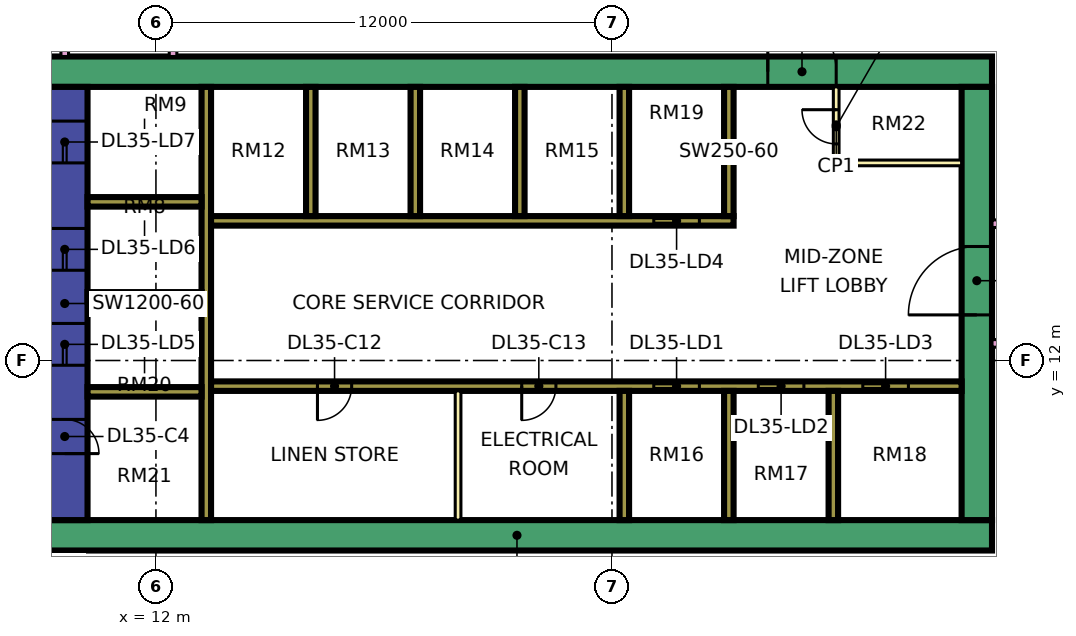
"""IFC4 building model, lengths in metres.
Left out: names, types, materials, properties, quantities, classifications, styles, units other than length and angle.
Written with IfcOpenShell. Run it as: python <this file> out.ifc"""

import sys

from ifc_helpers import new_model, si_unit, direction, frame, frame_2d, origin, place, context, subcontext, project, spatial, rectangle, extrude, element, fill, save


model = new_model("IFC4")
c1 = context("Model", 3, precision=1e-05, world=origin(), true_north=direction((0.0, 1.0)))
c2 = subcontext(c1, "Body", "Model", "MODEL_VIEW")
j1 = project(units=[si_unit("LENGTHUNIT", "METRE"), si_unit("PLANEANGLEUNIT", "RADIAN")], contexts=[c1])
p1 = place(None, origin())
s1 = spatial("IfcSite", under=j1, at=p1, CompositionType="ELEMENT")
p2 = place(p1, origin())
s2 = spatial("IfcBuilding", under=s1, at=p2, CompositionType="ELEMENT")
p3 = place(p2, frame((0.0, 0.0, 157.4)))
s3 = spatial("IfcBuildingStorey", under=s2, at=p3, CompositionType="ELEMENT", Elevation=157.4)
p4 = place(p3, frame((9.0, 7.4, 0.0), z_axis=(0.0, 0.0, 1.0), x_axis=(1.0, 0.0, 0.0)))
e1 = element("IfcWall", 1, at=p4, inside=s3, PredefinedType="SHEAR", context=c2, shape_type="SweptSolid", body=[
    extrude(rectangle(XDim=25.0, YDim=0.8, at=frame_2d((12.5, 0.0))), origin(), (0.0, 0.0, 1.0), 3.75),
])
p5 = place(p3, frame((9.0, 19.6, 0.0), z_axis=(0.0, 0.0, 1.0), x_axis=(1.0, 0.0, 0.0)))
e2 = element("IfcWall", 2, at=p5, inside=s3, PredefinedType="SHEAR", context=c2, shape_type="SweptSolid", body=[
    extrude(rectangle(XDim=25.0, YDim=0.8, at=frame_2d((12.5, 0.0))), origin(), (0.0, 0.0, 1.0), 3.75),
])
p6 = place(p5, frame((19.1, 0.0, 0.0)))
e3 = element("IfcOpeningElement", 3, at=p6, cuts=e2, PredefinedType="OPENING", context=c2, shape_type="SweptSolid", body=[
    extrude(rectangle(XDim=1.8, YDim=2.4, at=frame_2d((0.9, 1.2))), frame((0.0, 0.41, 0.0), z_axis=(0.0, -1.0, 0.0), x_axis=(1.0, 0.0, 0.0)), (0.0, 0.0, 1.0), 0.82),
])
p7 = place(p3, frame((9.6, 7.8, 0.0), z_axis=(0.0, 0.0, 1.0), x_axis=(0.0, 1.0, 0.0)))
e4 = element("IfcWall", 4, at=p7, inside=s3, PredefinedType="SHEAR", context=c2, shape_type="SweptSolid", body=[
    extrude(rectangle(XDim=11.4, YDim=1.2, at=frame_2d((5.7, 0.0))), origin(), (0.0, 0.0, 1.0), 3.75),
])
p8 = place(p7, frame((4.075, 0.0, 0.0)))
e5 = element("IfcOpeningElement", 5, at=p8, cuts=e4, PredefinedType="OPENING", context=c2, shape_type="SweptSolid", body=[
    extrude(rectangle(XDim=1.1, YDim=2.2, at=frame_2d((0.55, 1.1))), frame((0.0, 0.61, 0.0), z_axis=(0.0, -1.0, 0.0), x_axis=(1.0, 0.0, 0.0)), (0.0, 0.0, 1.0), 1.22),
])
p9 = place(p7, frame((6.575, 0.0, 0.0)))
e6 = element("IfcOpeningElement", 6, at=p9, cuts=e4, PredefinedType="OPENING", context=c2, shape_type="SweptSolid", body=[
    extrude(rectangle(XDim=1.1, YDim=2.2, at=frame_2d((0.55, 1.1))), frame((0.0, 0.61, 0.0), z_axis=(0.0, -1.0, 0.0), x_axis=(1.0, 0.0, 0.0)), (0.0, 0.0, 1.0), 1.22),
])
p10 = place(p7, frame((9.4, 0.0, 0.0)))
e7 = element("IfcOpeningElement", 7, at=p10, cuts=e4, PredefinedType="OPENING", context=c2, shape_type="SweptSolid", body=[
    extrude(rectangle(XDim=1.1, YDim=2.2, at=frame_2d((0.55, 1.1))), frame((0.0, 0.61, 0.0), z_axis=(0.0, -1.0, 0.0), x_axis=(1.0, 0.0, 0.0)), (0.0, 0.0, 1.0), 1.22),
])
p11 = place(p7, frame((1.75, 0.0, 0.0)))
e8 = element("IfcOpeningElement", 8, at=p11, cuts=e4, PredefinedType="OPENING", context=c2, shape_type="SweptSolid", body=[
    extrude(rectangle(XDim=0.9, YDim=2.1, at=frame_2d((0.45, 1.05))), frame((0.0, 0.61, 0.0), z_axis=(0.0, -1.0, 0.0), x_axis=(1.0, 0.0, 0.0)), (0.0, 0.0, 1.0), 1.22),
])
p12 = place(p3, frame((33.6, 7.8, 0.0), z_axis=(0.0, 0.0, 1.0), x_axis=(0.0, 1.0, 0.0)))
e9 = element("IfcWall", 9, at=p12, inside=s3, PredefinedType="SHEAR", context=c2, shape_type="SweptSolid", body=[
    extrude(rectangle(XDim=11.4, YDim=0.8, at=frame_2d((5.7, 0.0))), origin(), (0.0, 0.0, 1.0), 3.75),
])
p13 = place(p12, frame((5.4, 0.0, 0.0)))
e10 = element("IfcOpeningElement", 10, at=p13, cuts=e9, PredefinedType="OPENING", context=c2, shape_type="SweptSolid", body=[
    extrude(rectangle(XDim=1.8, YDim=2.4, at=frame_2d((0.9, 1.2))), frame((0.0, 0.41, 0.0), z_axis=(0.0, -1.0, 0.0), x_axis=(1.0, 0.0, 0.0)), (0.0, 0.0, 1.0), 0.82),
])
p14 = place(p3, frame((13.325, 7.8, 0.0), z_axis=(0.0, 0.0, 1.0), x_axis=(0.0, 1.0, 0.0)))
e11 = element("IfcWall", 11, at=p14, inside=s3, PredefinedType="SHEAR", context=c2, shape_type="SweptSolid", body=[
    extrude(rectangle(XDim=11.4, YDim=0.25, at=frame_2d((5.7, 0.0))), origin(), (0.0, 0.0, 1.0), 3.75),
])
p15 = place(p3, frame((13.45, 11.325, 0.0), z_axis=(0.0, 0.0, 1.0), x_axis=(1.0, 0.0, 0.0)))
e12 = element("IfcWall", 12, at=p15, inside=s3, PredefinedType="SHEAR", context=c2, shape_type="SweptSolid", body=[
    extrude(rectangle(XDim=19.75, YDim=0.25, at=frame_2d((9.875, 0.0))), origin(), (0.0, 0.0, 1.0), 3.75),
])
p16 = place(p15, frame((11.65, 0.0, 0.0)))
e13 = element("IfcOpeningElement", 13, at=p16, cuts=e12, PredefinedType="OPENING", context=c2, shape_type="SweptSolid", body=[
    extrude(rectangle(XDim=1.2, YDim=2.2, at=frame_2d((0.6, 1.1))), frame((0.0, 0.135, 0.0), z_axis=(0.0, -1.0, 0.0), x_axis=(1.0, 0.0, 0.0)), (0.0, 0.0, 1.0), 0.27),
])
p17 = place(p15, frame((14.4, 0.0, 0.0)))
e14 = element("IfcOpeningElement", 14, at=p17, cuts=e12, PredefinedType="OPENING", context=c2, shape_type="SweptSolid", body=[
    extrude(rectangle(XDim=1.2, YDim=2.2, at=frame_2d((0.6, 1.1))), frame((0.0, 0.135, 0.0), z_axis=(0.0, -1.0, 0.0), x_axis=(1.0, 0.0, 0.0)), (0.0, 0.0, 1.0), 0.27),
])
p18 = place(p15, frame((17.15, 0.0, 0.0)))
e15 = element("IfcOpeningElement", 15, at=p18, cuts=e12, PredefinedType="OPENING", context=c2, shape_type="SweptSolid", body=[
    extrude(rectangle(XDim=1.2, YDim=2.2, at=frame_2d((0.6, 1.1))), frame((0.0, 0.135, 0.0), z_axis=(0.0, -1.0, 0.0), x_axis=(1.0, 0.0, 0.0)), (0.0, 0.0, 1.0), 0.27),
])
p19 = place(p15, frame((2.8, 0.0, 0.0)))
e16 = element("IfcOpeningElement", 16, at=p19, cuts=e12, PredefinedType="OPENING", context=c2, shape_type="SweptSolid", body=[
    extrude(rectangle(XDim=0.9, YDim=2.1, at=frame_2d((0.45, 1.05))), frame((0.0, 0.135, 0.0), z_axis=(0.0, -1.0, 0.0), x_axis=(1.0, 0.0, 0.0)), (0.0, 0.0, 1.0), 0.27),
])
p20 = place(p15, frame((8.175, 0.0, 0.0)))
e17 = element("IfcOpeningElement", 17, at=p20, cuts=e12, PredefinedType="OPENING", context=c2, shape_type="SweptSolid", body=[
    extrude(rectangle(XDim=0.9, YDim=2.1, at=frame_2d((0.45, 1.05))), frame((0.0, 0.135, 0.0), z_axis=(0.0, -1.0, 0.0), x_axis=(1.0, 0.0, 0.0)), (0.0, 0.0, 1.0), 0.27),
])
p21 = place(p3, frame((13.45, 15.675, 0.0), z_axis=(0.0, 0.0, 1.0), x_axis=(1.0, 0.0, 0.0)))
e18 = element("IfcWall", 18, at=p21, inside=s3, PredefinedType="SHEAR", context=c2, shape_type="SweptSolid", body=[
    extrude(rectangle(XDim=13.75, YDim=0.25, at=frame_2d((6.875, 0.0))), origin(), (0.0, 0.0, 1.0), 3.75),
])
p22 = place(p21, frame((11.65, 0.0, 0.0)))
e19 = element("IfcOpeningElement", 19, at=p22, cuts=e18, PredefinedType="OPENING", context=c2, shape_type="SweptSolid", body=[
    extrude(rectangle(XDim=1.2, YDim=2.2, at=frame_2d((0.6, 1.1))), frame((0.0, 0.135, 0.0), z_axis=(0.0, -1.0, 0.0), x_axis=(1.0, 0.0, 0.0)), (0.0, 0.0, 1.0), 0.27),
])
for number, where, z_axis, x_axis in (
    (20, (10.2, 11.175, 0.0), (0.0, 0.0, 1.0), (1.0, 0.0, 0.0)),
    (21, (10.2, 13.675, 0.0), (0.0, 0.0, 1.0), (1.0, 0.0, 0.0)),
    (22, (10.2, 16.175, 0.0), (0.0, 0.0, 1.0), (1.0, 0.0, 0.0)),
):
    element("IfcWall", number, at=place(p3, frame(where, z_axis=z_axis, x_axis=x_axis)), inside=s3, PredefinedType="SHEAR", context=c2, shape_type="SweptSolid", body=[
        extrude(rectangle(XDim=3.0, YDim=0.25, at=frame_2d((1.5, 0.0))), origin(), (0.0, 0.0, 1.0), 3.75),
    ])
for number, where, z_axis, x_axis in (
    (23, (24.325, 7.8, 0.0), (0.0, 0.0, 1.0), (0.0, 1.0, 0.0)),
    (24, (27.075, 7.8, 0.0), (0.0, 0.0, 1.0), (0.0, 1.0, 0.0)),
    (25, (29.825, 7.8, 0.0), (0.0, 0.0, 1.0), (0.0, 1.0, 0.0)),
    (26, (16.075, 15.8, 0.0), (0.0, 0.0, 1.0), (0.0, 1.0, 0.0)),
    (27, (18.825, 15.8, 0.0), (0.0, 0.0, 1.0), (0.0, 1.0, 0.0)),
    (28, (21.575, 15.8, 0.0), (0.0, 0.0, 1.0), (0.0, 1.0, 0.0)),
    (29, (24.325, 15.8, 0.0), (0.0, 0.0, 1.0), (0.0, 1.0, 0.0)),
    (30, (27.075, 15.8, 0.0), (0.0, 0.0, 1.0), (0.0, 1.0, 0.0)),
):
    element("IfcWall", number, at=place(p3, frame(where, z_axis=z_axis, x_axis=x_axis)), inside=s3, PredefinedType="SHEAR", context=c2, shape_type="SweptSolid", body=[
        extrude(rectangle(XDim=3.4, YDim=0.25, at=frame_2d((1.7, 0.0))), origin(), (0.0, 0.0, 1.0), 3.75),
    ])
p23 = place(p3, frame((-1.447, 12.553, 0.0), z_axis=(0.0, 0.0, 1.0), x_axis=(0.707106781187, -0.707106781187, 0.0)))
e31 = element("IfcWall", 31, at=p23, inside=s3, PredefinedType="SOLIDWALL", context=c2, shape_type="SweptSolid", body=[
    extrude(rectangle(XDim=19.799, YDim=0.15, at=frame_2d((9.899, 0.0))), origin(), (0.0, 0.0, 1.0), 3.35),
])
p24 = place(p23, frame((2.212, 0.0, 0.45)))
e32 = element("IfcOpeningElement", 32, at=p24, cuts=e31, PredefinedType="OPENING", context=c2, shape_type="SweptSolid", body=[
    extrude(rectangle(XDim=3.0, YDim=2.4, at=frame_2d((1.5, 1.2))), frame((0.0, 0.085, 0.0), z_axis=(0.0, -1.0, 0.0), x_axis=(1.0, 0.0, 0.0)), (0.0, 0.0, 1.0), 0.17),
])
p25 = place(p23, frame((10.216, 0.0, 0.45)))
e33 = element("IfcOpeningElement", 33, at=p25, cuts=e31, PredefinedType="OPENING", context=c2, shape_type="SweptSolid", body=[
    extrude(rectangle(XDim=3.0, YDim=2.4, at=frame_2d((1.5, 1.2))), frame((0.0, 0.085, 0.0), z_axis=(0.0, -1.0, 0.0), x_axis=(1.0, 0.0, 0.0)), (0.0, 0.0, 1.0), 0.17),
])
p26 = place(p3, frame((19.95, 7.8, 0.0), z_axis=(0.0, 0.0, 1.0), x_axis=(0.0, 1.0, 0.0)))
e34 = element("IfcWall", 34, at=p26, inside=s3, PredefinedType="PARTITIONING", context=c2, shape_type="SweptSolid", body=[
    extrude(rectangle(XDim=3.4, YDim=0.15, at=frame_2d((1.7, 0.0))), origin(), (0.0, 0.0, 1.0), 3.35),
])
p27 = place(p3, frame((29.9, 17.2, 0.0), z_axis=(0.0, 0.0, 1.0), x_axis=(0.0, 1.0, 0.0)))
e35 = element("IfcWall", 35, at=p27, inside=s3, PredefinedType="PARTITIONING", context=c2, shape_type="SweptSolid", body=[
    extrude(rectangle(XDim=2.0, YDim=0.15, at=frame_2d((1.0, 0.0))), origin(), (0.0, 0.0, 1.0), 3.35),
])
p28 = place(p27, frame((0.5, 0.0, 0.0)))
e36 = element("IfcOpeningElement", 36, at=p28, cuts=e35, PredefinedType="OPENING", context=c2, shape_type="SweptSolid", body=[
    extrude(rectangle(XDim=0.9, YDim=2.1, at=frame_2d((0.45, 1.05))), frame((0.0, 0.085, 0.0), z_axis=(0.0, -1.0, 0.0), x_axis=(1.0, 0.0, 0.0)), (0.0, 0.0, 1.0), 0.17),
])
p29 = place(p3, frame((29.9, 17.2, 0.0), z_axis=(0.0, 0.0, 1.0), x_axis=(1.0, 0.0, 0.0)))
e37 = element("IfcWall", 37, at=p29, inside=s3, PredefinedType="PARTITIONING", context=c2, shape_type="SweptSolid", body=[
    extrude(rectangle(XDim=3.3, YDim=0.15, at=frame_2d((1.65, 0.0))), origin(), (0.0, 0.0, 1.0), 3.35),
])
p30 = place(p3, frame((9.6, 20.0, 0.0), z_axis=(0.0, 0.0, 1.0), x_axis=(0.0, 1.0, 0.0)))
e38 = element("IfcWall", 38, at=p30, inside=s3, PredefinedType="PARTITIONING", context=c2, shape_type="SweptSolid", body=[
    extrude(rectangle(XDim=42.926, YDim=0.2, at=frame_2d((21.463, 0.0))), origin(), (0.0, 0.0, 1.0), 3.35),
])
p31 = place(p30, frame((40.8, 0.0, 0.0)))
e39 = element("IfcOpeningElement", 39, at=p31, cuts=e38, PredefinedType="OPENING", context=c2, shape_type="SweptSolid", body=[
    extrude(rectangle(XDim=1.0, YDim=2.1, at=frame_2d((0.5, 1.05))), frame((0.0, 0.11, 0.0), z_axis=(0.0, -1.0, 0.0), x_axis=(1.0, 0.0, 0.0)), (0.0, 0.0, 1.0), 0.22),
])
p32 = place(p30, frame((0.6, 0.0, 0.0)))
e40 = element("IfcOpeningElement", 40, at=p32, cuts=e38, PredefinedType="OPENING", context=c2, shape_type="SweptSolid", body=[
    extrude(rectangle(XDim=1.2, YDim=2.1, at=frame_2d((0.6, 1.05))), frame((0.0, 0.11, 0.0), z_axis=(0.0, -1.0, 0.0), x_axis=(1.0, 0.0, 0.0)), (0.0, 0.0, 1.0), 0.22),
])
p33 = place(p30, frame((3.9, 0.0, 0.0)))
e41 = element("IfcOpeningElement", 41, at=p33, cuts=e38, PredefinedType="OPENING", context=c2, shape_type="SweptSolid", body=[
    extrude(rectangle(XDim=1.0, YDim=2.1, at=frame_2d((0.5, 1.05))), frame((0.0, 0.11, 0.0), z_axis=(0.0, -1.0, 0.0), x_axis=(1.0, 0.0, 0.0)), (0.0, 0.0, 1.0), 0.22),
])
p34 = place(p3, frame((12.45, 20.0, 0.0), z_axis=(0.0, 0.0, 1.0), x_axis=(0.0, 1.0, 0.0)))
e42 = element("IfcWall", 42, at=p34, inside=s3, PredefinedType="PARTITIONING", context=c2, shape_type="SweptSolid", body=[
    extrude(rectangle(XDim=43.0, YDim=0.2, at=frame_2d((21.5, 0.0))), origin(), (0.0, 0.0, 1.0), 3.35),
])
p35 = place(p34, frame((5.95, 0.0, 0.0)))
e43 = element("IfcOpeningElement", 43, at=p35, cuts=e42, PredefinedType="OPENING", context=c2, shape_type="SweptSolid", body=[
    extrude(rectangle(XDim=1.0, YDim=2.1, at=frame_2d((0.5, 1.05))), frame((0.0, 0.11, 0.0), z_axis=(0.0, -1.0, 0.0), x_axis=(1.0, 0.0, 0.0)), (0.0, 0.0, 1.0), 0.22),
])
p36 = place(p34, frame((12.0, 0.0, 0.0)))
e44 = element("IfcOpeningElement", 44, at=p36, cuts=e42, PredefinedType="OPENING", context=c2, shape_type="SweptSolid", body=[
    extrude(rectangle(XDim=1.0, YDim=2.1, at=frame_2d((0.5, 1.05))), frame((0.0, 0.11, 0.0), z_axis=(0.0, -1.0, 0.0), x_axis=(1.0, 0.0, 0.0)), (0.0, 0.0, 1.0), 0.22),
])
p37 = place(p34, frame((23.35, 0.0, 0.0)))
e45 = element("IfcOpeningElement", 45, at=p37, cuts=e42, PredefinedType="OPENING", context=c2, shape_type="SweptSolid", body=[
    extrude(rectangle(XDim=1.0, YDim=2.1, at=frame_2d((0.5, 1.05))), frame((0.0, 0.11, 0.0), z_axis=(0.0, -1.0, 0.0), x_axis=(1.0, 0.0, 0.0)), (0.0, 0.0, 1.0), 0.22),
])
p38 = place(p34, frame((35.2, 0.0, 0.0)))
e46 = element("IfcOpeningElement", 46, at=p38, cuts=e42, PredefinedType="OPENING", context=c2, shape_type="SweptSolid", body=[
    extrude(rectangle(XDim=1.0, YDim=2.1, at=frame_2d((0.5, 1.05))), frame((0.0, 0.11, 0.0), z_axis=(0.0, -1.0, 0.0), x_axis=(1.0, 0.0, 0.0)), (0.0, 0.0, 1.0), 0.22),
])
p39 = place(p34, frame((1.15, 0.0, 0.0)))
e47 = element("IfcOpeningElement", 47, at=p39, cuts=e42, PredefinedType="OPENING", context=c2, shape_type="SweptSolid", body=[
    extrude(rectangle(XDim=1.8, YDim=2.1, at=frame_2d((0.9, 1.05))), frame((0.0, 0.11, 0.0), z_axis=(0.0, -1.0, 0.0), x_axis=(1.0, 0.0, 0.0)), (0.0, 0.0, 1.0), 0.22),
])
p40 = place(p34, frame((28.6, 0.0, 0.0)))
e48 = element("IfcOpeningElement", 48, at=p40, cuts=e42, PredefinedType="OPENING", context=c2, shape_type="SweptSolid", body=[
    extrude(rectangle(XDim=1.8, YDim=2.1, at=frame_2d((0.9, 1.05))), frame((0.0, 0.11, 0.0), z_axis=(0.0, -1.0, 0.0), x_axis=(1.0, 0.0, 0.0)), (0.0, 0.0, 1.0), 0.22),
])
p41 = place(p3, frame((34.0, 12.45, 0.0), z_axis=(0.0, 0.0, 1.0), x_axis=(1.0, 0.0, 0.0)))
e49 = element("IfcWall", 49, at=p41, inside=s3, PredefinedType="PARTITIONING", context=c2, shape_type="SweptSolid", body=[
    extrude(rectangle(XDim=2.451, YDim=0.2, at=frame_2d((1.226, 0.0))), origin(), (0.0, 0.0, 1.0), 3.35),
])
p42 = place(p3, frame((34.0, 15.6, 0.0), z_axis=(0.0, 0.0, 1.0), x_axis=(1.0, 0.0, 0.0)))
e50 = element("IfcWall", 50, at=p42, inside=s3, PredefinedType="PARTITIONING", context=c2, shape_type="SweptSolid", body=[
    extrude(rectangle(XDim=10.35, YDim=0.2, at=frame_2d((5.175, 0.0))), origin(), (0.0, 0.0, 1.0), 3.35),
])
p43 = place(p42, frame((5.6, 0.0, 0.0)))
e51 = element("IfcOpeningElement", 51, at=p43, cuts=e50, PredefinedType="OPENING", context=c2, shape_type="SweptSolid", body=[
    extrude(rectangle(XDim=1.0, YDim=2.1, at=frame_2d((0.5, 1.05))), frame((0.0, 0.11, 0.0), z_axis=(0.0, -1.0, 0.0), x_axis=(1.0, 0.0, 0.0)), (0.0, 0.0, 1.0), 0.22),
])
p44 = place(p42, frame((0.45, 0.0, 0.0)))
e52 = element("IfcOpeningElement", 52, at=p44, cuts=e50, PredefinedType="OPENING", context=c2, shape_type="SweptSolid", body=[
    extrude(rectangle(XDim=1.2, YDim=2.1, at=frame_2d((0.6, 1.05))), frame((0.0, 0.11, 0.0), z_axis=(0.0, -1.0, 0.0), x_axis=(1.0, 0.0, 0.0)), (0.0, 0.0, 1.0), 0.22),
])
p45 = place(p16, origin())
e53 = element("IfcDoor", 53, at=p45, inside=s3, OperationType="DOUBLE_DOOR_SLIDING", PredefinedType="DOOR", context=c2, shape_type="SweptSolid", body=[
    extrude(rectangle(XDim=1.2, YDim=2.2, at=frame_2d((0.6, 1.1))), frame((0.0, 0.025, 0.0), z_axis=(0.0, -1.0, 0.0), x_axis=(1.0, 0.0, 0.0)), (0.0, 0.0, 1.0), 0.05),
])
fill(e13, e53)
p46 = place(p17, origin())
e54 = element("IfcDoor", 54, at=p46, inside=s3, OperationType="DOUBLE_DOOR_SLIDING", PredefinedType="DOOR", context=c2, shape_type="SweptSolid", body=[
    extrude(rectangle(XDim=1.2, YDim=2.2, at=frame_2d((0.6, 1.1))), frame((0.0, 0.025, 0.0), z_axis=(0.0, -1.0, 0.0), x_axis=(1.0, 0.0, 0.0)), (0.0, 0.0, 1.0), 0.05),
])
fill(e14, e54)
p47 = place(p18, origin())
e55 = element("IfcDoor", 55, at=p47, inside=s3, OperationType="DOUBLE_DOOR_SLIDING", PredefinedType="DOOR", context=c2, shape_type="SweptSolid", body=[
    extrude(rectangle(XDim=1.2, YDim=2.2, at=frame_2d((0.6, 1.1))), frame((0.0, 0.025, 0.0), z_axis=(0.0, -1.0, 0.0), x_axis=(1.0, 0.0, 0.0)), (0.0, 0.0, 1.0), 0.05),
])
fill(e15, e55)
p48 = place(p22, origin())
e56 = element("IfcDoor", 56, at=p48, inside=s3, OperationType="DOUBLE_DOOR_SLIDING", PredefinedType="DOOR", context=c2, shape_type="SweptSolid", body=[
    extrude(rectangle(XDim=1.2, YDim=2.2, at=frame_2d((0.6, 1.1))), frame((0.0, 0.025, 0.0), z_axis=(0.0, -1.0, 0.0), x_axis=(1.0, 0.0, 0.0)), (0.0, 0.0, 1.0), 0.05),
])
fill(e19, e56)
p49 = place(p8, origin())
e57 = element("IfcDoor", 57, at=p49, inside=s3, OperationType="DOUBLE_DOOR_SLIDING", PredefinedType="DOOR", context=c2, shape_type="SweptSolid", body=[
    extrude(rectangle(XDim=1.1, YDim=2.2, at=frame_2d((0.55, 1.1))), frame((0.0, 0.025, 0.0), z_axis=(0.0, -1.0, 0.0), x_axis=(1.0, 0.0, 0.0)), (0.0, 0.0, 1.0), 0.05),
])
fill(e5, e57)
p50 = place(p9, origin())
e58 = element("IfcDoor", 58, at=p50, inside=s3, OperationType="DOUBLE_DOOR_SLIDING", PredefinedType="DOOR", context=c2, shape_type="SweptSolid", body=[
    extrude(rectangle(XDim=1.1, YDim=2.2, at=frame_2d((0.55, 1.1))), frame((0.0, 0.025, 0.0), z_axis=(0.0, -1.0, 0.0), x_axis=(1.0, 0.0, 0.0)), (0.0, 0.0, 1.0), 0.05),
])
fill(e6, e58)
p51 = place(p10, origin())
e59 = element("IfcDoor", 59, at=p51, inside=s3, OperationType="DOUBLE_DOOR_SLIDING", PredefinedType="DOOR", context=c2, shape_type="SweptSolid", body=[
    extrude(rectangle(XDim=1.1, YDim=2.2, at=frame_2d((0.55, 1.1))), frame((0.0, 0.025, 0.0), z_axis=(0.0, -1.0, 0.0), x_axis=(1.0, 0.0, 0.0)), (0.0, 0.0, 1.0), 0.05),
])
fill(e7, e59)
p52 = place(p13, origin())
e60 = element("IfcDoor", 60, at=p52, inside=s3, OperationType="DOUBLE_DOOR_SINGLE_SWING", PredefinedType="DOOR", context=c2, shape_type="SweptSolid", body=[
    extrude(rectangle(XDim=1.8, YDim=2.4, at=frame_2d((0.9, 1.2))), frame((0.0, 0.025, 0.0), z_axis=(0.0, -1.0, 0.0), x_axis=(1.0, 0.0, 0.0)), (0.0, 0.0, 1.0), 0.05),
])
fill(e10, e60)
p53 = place(p6, origin())
e61 = element("IfcDoor", 61, at=p53, inside=s3, OperationType="DOUBLE_DOOR_SINGLE_SWING", PredefinedType="DOOR", context=c2, shape_type="SweptSolid", body=[
    extrude(rectangle(XDim=1.8, YDim=2.4, at=frame_2d((0.9, 1.2))), frame((0.0, 0.025, 0.0), z_axis=(0.0, -1.0, 0.0), x_axis=(1.0, 0.0, 0.0)), (0.0, 0.0, 1.0), 0.05),
])
fill(e3, e61)
p54 = place(p11, frame((0.9, 0.0, 0.0), z_axis=(0.0, 0.0, 1.0), x_axis=(-1.0, 0.0, 0.0)))
e62 = element("IfcDoor", 62, at=p54, inside=s3, OperationType="SINGLE_SWING_LEFT", PredefinedType="DOOR", context=c2, shape_type="SweptSolid", body=[
    extrude(rectangle(XDim=0.9, YDim=2.1, at=frame_2d((0.45, 1.05))), frame((0.0, 0.025, 0.0), z_axis=(0.0, -1.0, 0.0), x_axis=(1.0, 0.0, 0.0)), (0.0, 0.0, 1.0), 0.05),
])
fill(e8, e62)
p55 = place(p19, frame((0.9, 0.0, 0.0), z_axis=(0.0, 0.0, 1.0), x_axis=(-1.0, 0.0, 0.0)))
e63 = element("IfcDoor", 63, at=p55, inside=s3, OperationType="SINGLE_SWING_LEFT", PredefinedType="DOOR", context=c2, shape_type="SweptSolid", body=[
    extrude(rectangle(XDim=0.9, YDim=2.1, at=frame_2d((0.45, 1.05))), frame((0.0, 0.025, 0.0), z_axis=(0.0, -1.0, 0.0), x_axis=(1.0, 0.0, 0.0)), (0.0, 0.0, 1.0), 0.05),
])
fill(e16, e63)
p56 = place(p20, frame((0.9, 0.0, 0.0), z_axis=(0.0, 0.0, 1.0), x_axis=(-1.0, 0.0, 0.0)))
e64 = element("IfcDoor", 64, at=p56, inside=s3, OperationType="SINGLE_SWING_LEFT", PredefinedType="DOOR", context=c2, shape_type="SweptSolid", body=[
    extrude(rectangle(XDim=0.9, YDim=2.1, at=frame_2d((0.45, 1.05))), frame((0.0, 0.025, 0.0), z_axis=(0.0, -1.0, 0.0), x_axis=(1.0, 0.0, 0.0)), (0.0, 0.0, 1.0), 0.05),
])
fill(e17, e64)
p57 = place(p28, frame((0.9, 0.0, 0.0), z_axis=(0.0, 0.0, 1.0), x_axis=(-1.0, 0.0, 0.0)))
e65 = element("IfcDoor", 65, at=p57, inside=s3, OperationType="SINGLE_SWING_RIGHT", PredefinedType="DOOR", context=c2, shape_type="SweptSolid", body=[
    extrude(rectangle(XDim=0.9, YDim=2.1, at=frame_2d((0.45, 1.05))), frame((0.0, 0.025, 0.0), z_axis=(0.0, -1.0, 0.0), x_axis=(1.0, 0.0, 0.0)), (0.0, 0.0, 1.0), 0.05),
])
fill(e36, e65)
save(model, sys.argv[1])
